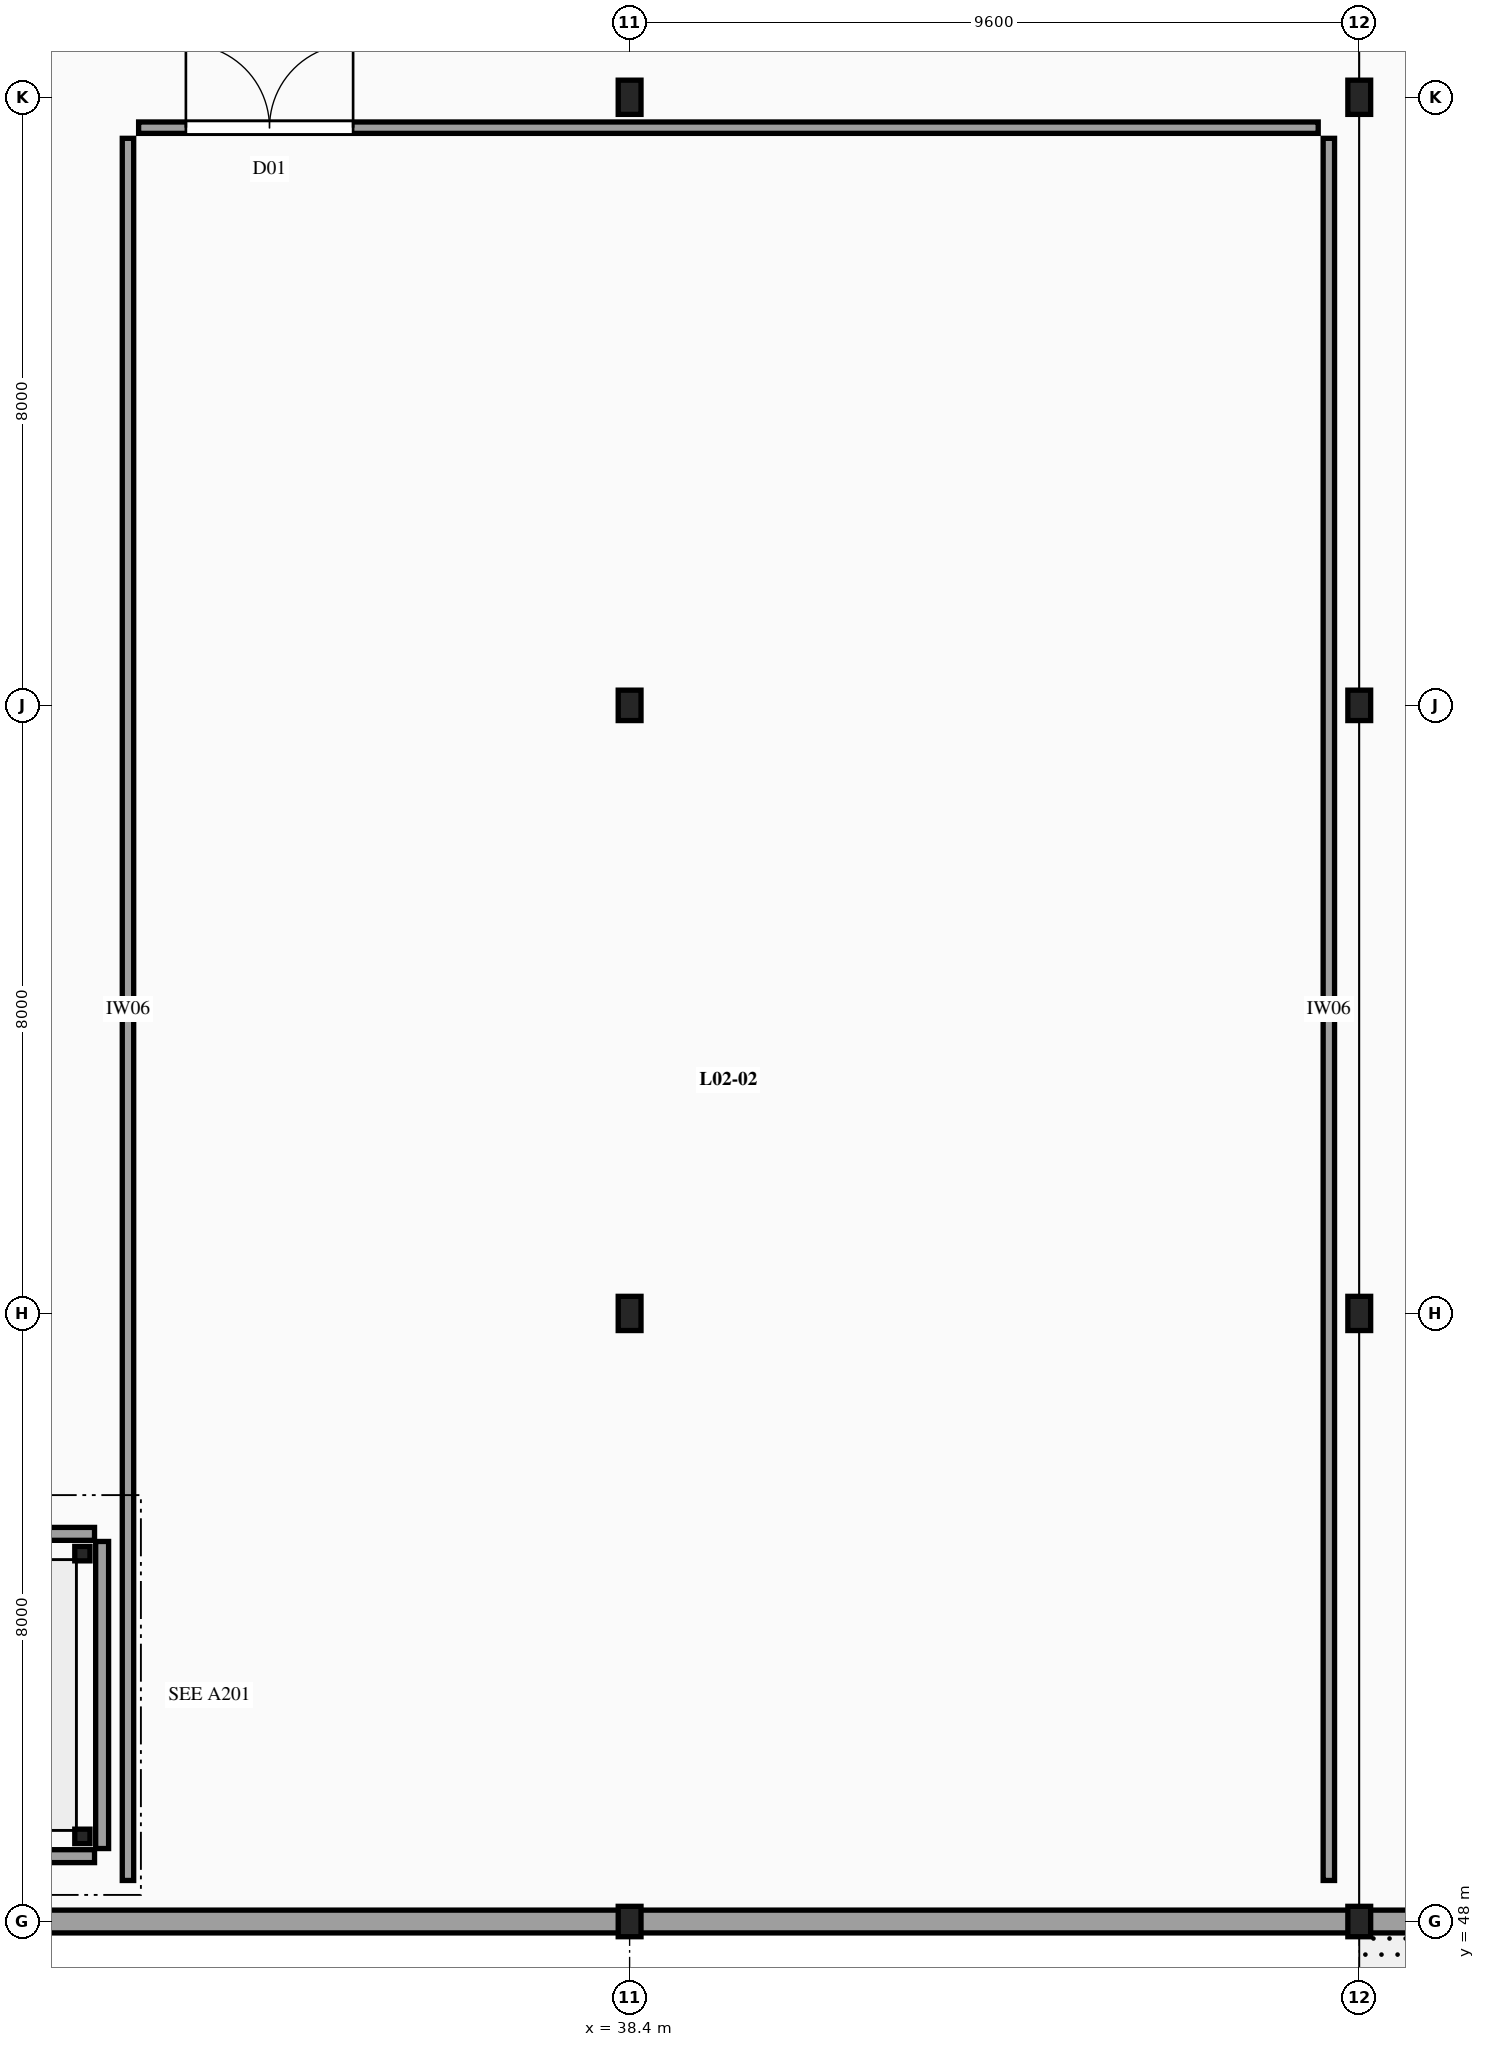
"""IFC4 building model, lengths in metres.
Left out: names, types, materials, properties, quantities, classifications, styles, units other than length and angle.
Written with IfcOpenShell. Run it as: python <this file> out.ifc"""

import sys

from ifc_helpers import new_model, si_unit, direction, frame, frame_2d, origin, origin_2d, place, context, subcontext, project, spatial, rectangle, i_section, extrude, element, fill, save


model = new_model("IFC4")
c1 = context("Model", 3, precision=1e-05, world=origin(), true_north=direction((0.0, 1.0)))
c2 = subcontext(c1, "Body", "Model", "MODEL_VIEW")
j1 = project(units=[si_unit("LENGTHUNIT", "METRE"), si_unit("PLANEANGLEUNIT", "RADIAN")], contexts=[c1])
p1 = place(None, origin())
s1 = spatial("IfcSite", under=j1, at=p1, CompositionType="ELEMENT")
p2 = place(p1, origin())
s2 = spatial("IfcBuilding", under=s1, at=p2, CompositionType="ELEMENT")
p3 = place(p2, frame((0.0, 0.0, 8.7)))
s3 = spatial("IfcBuildingStorey", under=s2, at=p3, CompositionType="ELEMENT", Elevation=8.7)
p4 = place(p3, frame((38.4, 48.0, -0.26), z_axis=(0.0, 0.0, 1.0), x_axis=(1.0, 0.0, 0.0)))
e1 = element("IfcColumn", 1, at=p4, inside=s3, PredefinedType="COLUMN", context=c2, shape_type="SweptSolid", body=[
    extrude(i_section(OverallWidth=0.3, OverallDepth=0.4, WebThickness=0.013, FlangeThickness=0.024, FilletRadius=0.027, at=origin_2d()), origin(), (0.0, 0.0, 1.0), 4.2),
])
p5 = place(p3, frame((38.4, 56.0, -0.26), z_axis=(0.0, 0.0, 1.0), x_axis=(1.0, 0.0, 0.0)))
e2 = element("IfcColumn", 2, at=p5, inside=s3, PredefinedType="COLUMN", context=c2, shape_type="SweptSolid", body=[
    extrude(i_section(OverallWidth=0.3, OverallDepth=0.45, WebThickness=0.014, FlangeThickness=0.026, FilletRadius=0.027, at=origin_2d()), origin(), (0.0, 0.0, 1.0), 4.2),
])
p6 = place(p3, frame((38.4, 64.0, -0.26), z_axis=(0.0, 0.0, 1.0), x_axis=(1.0, 0.0, 0.0)))
e3 = element("IfcColumn", 3, at=p6, inside=s3, PredefinedType="COLUMN", context=c2, shape_type="SweptSolid", body=[
    extrude(i_section(OverallWidth=0.3, OverallDepth=0.4, WebThickness=0.013, FlangeThickness=0.024, FilletRadius=0.027, at=origin_2d()), origin(), (0.0, 0.0, 1.0), 4.2),
])
p7 = place(p3, frame((38.4, 72.0, -0.26), z_axis=(0.0, 0.0, 1.0), x_axis=(1.0, 0.0, 0.0)))
e4 = element("IfcColumn", 4, at=p7, inside=s3, PredefinedType="COLUMN", context=c2, shape_type="SweptSolid", body=[
    extrude(i_section(OverallWidth=0.3, OverallDepth=0.45, WebThickness=0.014, FlangeThickness=0.026, FilletRadius=0.027, at=origin_2d()), origin(), (0.0, 0.0, 1.0), 4.2),
])
p8 = place(p3, frame((48.0, 48.0, -0.26), z_axis=(0.0, 0.0, 1.0), x_axis=(1.0, 0.0, 0.0)))
e5 = element("IfcColumn", 5, at=p8, inside=s3, PredefinedType="COLUMN", context=c2, shape_type="SweptSolid", body=[
    extrude(i_section(OverallWidth=0.3, OverallDepth=0.4, WebThickness=0.013, FlangeThickness=0.024, FilletRadius=0.027, at=origin_2d()), origin(), (0.0, 0.0, 1.0), 4.2),
])
p9 = place(p3, frame((48.0, 56.0, -0.26), z_axis=(0.0, 0.0, 1.0), x_axis=(1.0, 0.0, 0.0)))
e6 = element("IfcColumn", 6, at=p9, inside=s3, PredefinedType="COLUMN", context=c2, shape_type="SweptSolid", body=[
    extrude(i_section(OverallWidth=0.3, OverallDepth=0.45, WebThickness=0.014, FlangeThickness=0.026, FilletRadius=0.027, at=origin_2d()), origin(), (0.0, 0.0, 1.0), 4.2),
])
p10 = place(p3, frame((48.0, 64.0, -0.26), z_axis=(0.0, 0.0, 1.0), x_axis=(1.0, 0.0, 0.0)))
e7 = element("IfcColumn", 7, at=p10, inside=s3, PredefinedType="COLUMN", context=c2, shape_type="SweptSolid", body=[
    extrude(i_section(OverallWidth=0.3, OverallDepth=0.4, WebThickness=0.013, FlangeThickness=0.024, FilletRadius=0.027, at=origin_2d()), origin(), (0.0, 0.0, 1.0), 4.2),
])
p11 = place(p3, frame((48.0, 72.0, -0.26), z_axis=(0.0, 0.0, 1.0), x_axis=(1.0, 0.0, 0.0)))
e8 = element("IfcColumn", 8, at=p11, inside=s3, PredefinedType="COLUMN", context=c2, shape_type="SweptSolid", body=[
    extrude(i_section(OverallWidth=0.3, OverallDepth=0.45, WebThickness=0.014, FlangeThickness=0.026, FilletRadius=0.027, at=origin_2d()), origin(), (0.0, 0.0, 1.0), 4.2),
])
for number, where, z_axis, x_axis in (
    (9, (31.2, 49.12, 0.0), (0.0, 0.0, 1.0), (1.0, 0.0, 0.0)),
    (10, (31.2, 52.84, 0.0), (0.0, 0.0, 1.0), (1.0, 0.0, 0.0)),
):
    element("IfcColumn", number, at=place(p3, frame(where, z_axis=z_axis, x_axis=x_axis)), inside=s3, PredefinedType="COLUMN", context=c2, shape_type="SweptSolid", body=[
        extrude(i_section(OverallWidth=0.2, OverallDepth=0.19, WebThickness=0.007, FlangeThickness=0.01, FilletRadius=0.018, at=origin_2d()), origin(), (0.0, 0.0, 1.0), 4.2),
    ])
p12 = place(p3, frame((28.82, 48.0, 0.0), z_axis=(0.0, 0.0, 1.0), x_axis=(1.0, 0.0, 0.0)))
e11 = element("IfcWall", 11, at=p12, inside=s3, PredefinedType="SOLIDWALL", context=c2, shape_type="SweptSolid", body=[
    extrude(rectangle(XDim=9.56, YDim=0.3, at=frame_2d((4.78, 0.0))), origin(), (0.0, 0.0, 1.0), 3.36),
])
for number, where, z_axis, x_axis in (
    (12, (38.42, 48.0, 0.0), (0.0, 0.0, 1.0), (1.0, 0.0, 0.0)),
    (13, (48.02, 48.0, 0.0), (0.0, 0.0, 1.0), (1.0, 0.0, 0.0)),
):
    element("IfcWall", number, at=place(p3, frame(where, z_axis=z_axis, x_axis=x_axis)), inside=s3, PredefinedType="SOLIDWALL", context=c2, shape_type="SweptSolid", body=[
        extrude(rectangle(XDim=9.56, YDim=0.3, at=frame_2d((4.78, 0.0))), origin(), (0.0, 0.0, 1.0), 3.36),
    ])
p13 = place(p3, frame((31.46, 48.96, 0.0), z_axis=(0.0, 0.0, 1.0), x_axis=(0.0, 1.0, 0.0)))
e14 = element("IfcWall", 14, at=p13, inside=s3, PredefinedType="SOLIDWALL", context=c2, shape_type="SweptSolid", body=[
    extrude(rectangle(XDim=4.04, YDim=0.17, at=frame_2d((2.02, 0.0))), origin(), (0.0, 0.0, 1.0), 3.1),
])
for number, where, z_axis, x_axis in (
    (15, (21.36, 48.86, 0.0), (0.0, 0.0, 1.0), (1.0, 0.0, 0.0)),
    (16, (21.36, 53.1, 0.0), (0.0, 0.0, 1.0), (1.0, 0.0, 0.0)),
):
    element("IfcWall", number, at=place(p3, frame(where, z_axis=z_axis, x_axis=x_axis)), inside=s3, PredefinedType="SOLIDWALL", context=c2, shape_type="SweptSolid", body=[
        extrude(rectangle(XDim=10.0, YDim=0.17, at=frame_2d((5.0, 0.0))), origin(), (0.0, 0.0, 1.0), 3.1),
    ])
p14 = place(p3, frame((31.94, 71.6, 0.0), z_axis=(0.0, 0.0, 1.0), x_axis=(1.0, 0.0, 0.0)))
e17 = element("IfcWall", 17, at=p14, inside=s3, PredefinedType="PARTITIONING", context=c2, shape_type="SweptSolid", body=[
    extrude(rectangle(XDim=15.52, YDim=0.15, at=frame_2d((7.76, 0.0))), origin(), (0.0, 0.0, 1.0), 3.1),
])
p15 = place(p14, frame((0.622, 0.0, 0.0)))
e18 = element("IfcOpeningElement", 18, at=p15, cuts=e17, PredefinedType="OPENING", context=c2, shape_type="SweptSolid", body=[
    extrude(rectangle(XDim=2.2, YDim=2.7, at=frame_2d((1.1, 1.35))), frame((0.0, 0.085, 0.0), z_axis=(0.0, -1.0, 0.0), x_axis=(1.0, 0.0, 0.0)), (0.0, 0.0, 1.0), 0.17),
])
for number, where, z_axis, x_axis in (
    (19, (31.8, 48.54, 0.0), (0.0, 0.0, 1.0), (0.0, 1.0, 0.0)),
    (20, (47.6, 48.54, 0.0), (0.0, 0.0, 1.0), (0.0, 1.0, 0.0)),
):
    element("IfcWall", number, at=place(p3, frame(where, z_axis=z_axis, x_axis=x_axis)), inside=s3, PredefinedType="PARTITIONING", context=c2, shape_type="SweptSolid", body=[
        extrude(rectangle(XDim=22.92, YDim=0.15, at=frame_2d((11.46, 0.0))), origin(), (0.0, 0.0, 1.0), 3.1),
    ])
p16 = place(p15, origin())
e21 = element("IfcDoor", 21, at=p16, inside=s3, OperationType="DOUBLE_DOOR_SINGLE_SWING", PredefinedType="DOOR", context=c2, shape_type="SweptSolid", body=[
    extrude(rectangle(XDim=2.2, YDim=2.7, at=frame_2d((1.1, 1.35))), frame((0.0, 0.025, 0.0), z_axis=(0.0, -1.0, 0.0), x_axis=(1.0, 0.0, 0.0)), (0.0, 0.0, 1.0), 0.05),
])
fill(e18, e21)
save(model, sys.argv[1])
